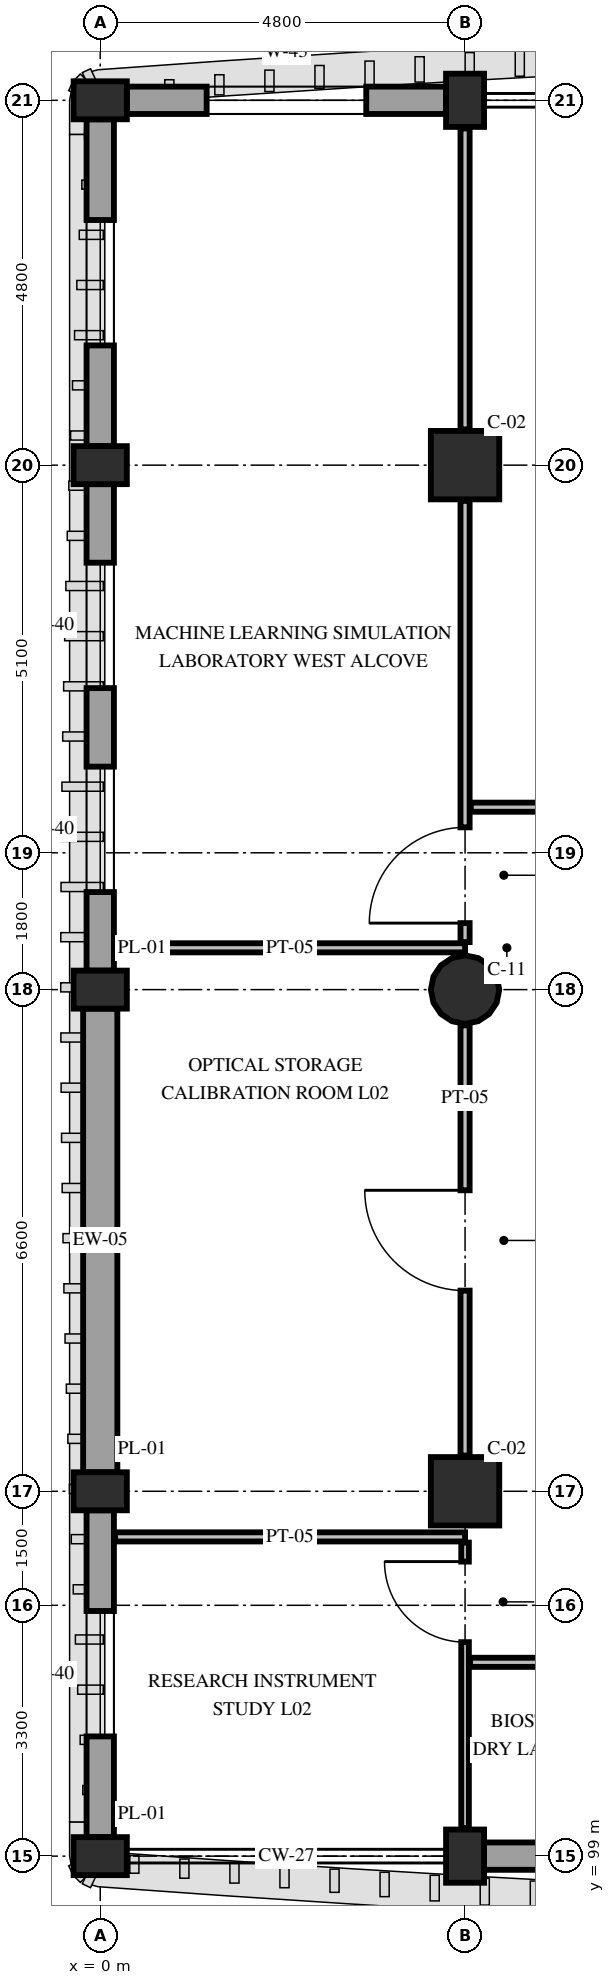
"""IFC4 building model, lengths in metres.
Left out: names, types, materials, properties, quantities, classifications, styles, units other than length and angle.
Written with IfcOpenShell. Run it as: python <this file> out.ifc"""

import sys

from ifc_helpers import new_model, si_unit, direction, frame, frame_2d, origin, origin_2d, place, context, subcontext, project, spatial, rectangle, circle, extrude, element, fill, save


model = new_model("IFC4")
c1 = context("Model", 3, precision=1e-05, world=origin(), true_north=direction((0.0, 1.0)))
c2 = subcontext(c1, "Body", "Model", "MODEL_VIEW")
j1 = project(units=[si_unit("LENGTHUNIT", "METRE"), si_unit("PLANEANGLEUNIT", "RADIAN")], contexts=[c1])
p1 = place(None, origin())
s1 = spatial("IfcSite", under=j1, at=p1, CompositionType="ELEMENT")
p2 = place(p1, origin())
s2 = spatial("IfcBuilding", under=s1, at=p2, CompositionType="ELEMENT")
p3 = place(p2, frame((0.0, 0.0, 10.2)))
s3 = spatial("IfcBuildingStorey", under=s2, at=p3, CompositionType="ELEMENT", Elevation=10.2)
for number, where, z_axis, x_axis in (
    (1, (0.0, 99.0, 0.0), (0.0, 0.0, 1.0), (0.0, 1.0, 0.0)),
    (2, (0.0, 103.8, 0.0), (0.0, 0.0, 1.0), (0.0, 1.0, 0.0)),
    (3, (0.0, 110.4, 0.0), (0.0, 0.0, 1.0), (0.0, 1.0, 0.0)),
    (4, (0.0, 117.3, 0.0), (0.0, 0.0, 1.0), (0.0, 1.0, 0.0)),
    (5, (0.0, 122.1, 0.0), (0.0, 0.0, 1.0), (0.0, 1.0, 0.0)),
    (6, (4.8, 99.0, 0.0), (0.0, 0.0, 1.0), (1.0, 0.0, 0.0)),
):
    element("IfcColumn", number, at=place(p3, frame(where, z_axis=z_axis, x_axis=x_axis)), inside=s3, PredefinedType="PILASTER", context=c2, shape_type="SweptSolid", body=[
        extrude(rectangle(XDim=0.5, YDim=0.7, at=origin_2d()), origin(), (0.0, 0.0, 1.0), 4.8),
    ])
p4 = place(p3, frame((4.8, 103.8, 0.0), z_axis=(0.0, 0.0, 1.0), x_axis=(1.0, 0.0, 0.0)))
e7 = element("IfcColumn", 7, at=p4, inside=s3, PredefinedType="COLUMN", context=c2, shape_type="SweptSolid", body=[
    extrude(rectangle(XDim=0.9, YDim=0.9, at=origin_2d()), origin(), (0.0, 0.0, 1.0), 4.8),
])
p5 = place(p3, frame((4.8, 110.4, 0.0), z_axis=(0.0, 0.0, 1.0), x_axis=(1.0, 0.0, 0.0)))
e8 = element("IfcColumn", 8, at=p5, inside=s3, PredefinedType="COLUMN", context=c2, shape_type="SweptSolid", body=[
    extrude(circle(Radius=0.45, at=origin_2d()), origin(), (0.0, 0.0, 1.0), 4.8),
])
p6 = place(p3, frame((4.8, 117.3, 0.0), z_axis=(0.0, 0.0, 1.0), x_axis=(1.0, 0.0, 0.0)))
e9 = element("IfcColumn", 9, at=p6, inside=s3, PredefinedType="COLUMN", context=c2, shape_type="SweptSolid", body=[
    extrude(rectangle(XDim=0.9, YDim=0.9, at=origin_2d()), origin(), (0.0, 0.0, 1.0), 4.8),
])
p7 = place(p3, frame((4.8, 122.1, 0.0), z_axis=(0.0, 0.0, 1.0), x_axis=(1.0, 0.0, 0.0)))
e10 = element("IfcColumn", 10, at=p7, inside=s3, PredefinedType="PILASTER", context=c2, shape_type="SweptSolid", body=[
    extrude(rectangle(XDim=0.5, YDim=0.7, at=origin_2d()), origin(), (0.0, 0.0, 1.0), 4.8),
])
p8 = place(p3, frame((0.0, 99.25, 0.0), z_axis=(0.0, 0.0, 1.0), x_axis=(0.0, 1.0, 0.0)))
e11 = element("IfcWall", 11, at=p8, inside=s3, PredefinedType="STANDARD", context=c2, shape_type="SweptSolid", body=[
    extrude(rectangle(XDim=4.3, YDim=0.36, at=frame_2d((2.15, 0.0))), origin(), (0.0, 0.0, 1.0), 3.95),
])
p9 = place(p8, frame((1.325, 0.0, 0.85)))
e12 = element("IfcOpeningElement", 12, at=p9, cuts=e11, PredefinedType="OPENING", context=c2, shape_type="SweptSolid", body=[
    extrude(rectangle(XDim=1.65, YDim=2.08, at=frame_2d((0.825, 1.04))), frame((0.0, 0.195, 0.0), z_axis=(0.0, -1.0, 0.0), x_axis=(1.0, 0.0, 0.0)), (0.0, 0.0, 1.0), 0.39),
])
p10 = place(p3, frame((0.0, 104.05, 0.0), z_axis=(0.0, 0.0, 1.0), x_axis=(0.0, 1.0, 0.0)))
e13 = element("IfcWall", 13, at=p10, inside=s3, PredefinedType="SOLIDWALL", context=c2, shape_type="SweptSolid", body=[
    extrude(rectangle(XDim=6.1, YDim=0.45, at=frame_2d((3.05, 0.0))), origin(), (0.0, 0.0, 1.0), 3.95),
])
p11 = place(p3, frame((0.0, 110.65, 0.0), z_axis=(0.0, 0.0, 1.0), x_axis=(0.0, 1.0, 0.0)))
e14 = element("IfcWall", 14, at=p11, inside=s3, PredefinedType="STANDARD", context=c2, shape_type="SweptSolid", body=[
    extrude(rectangle(XDim=6.4, YDim=0.36, at=frame_2d((3.2, 0.0))), origin(), (0.0, 0.0, 1.0), 3.95),
])
p12 = place(p11, frame((1.033, 0.0, 0.85)))
e15 = element("IfcOpeningElement", 15, at=p12, cuts=e14, PredefinedType="OPENING", context=c2, shape_type="SweptSolid", body=[
    extrude(rectangle(XDim=1.65, YDim=2.08, at=frame_2d((0.825, 1.04))), frame((0.0, 0.195, 0.0), z_axis=(0.0, -1.0, 0.0), x_axis=(1.0, 0.0, 0.0)), (0.0, 0.0, 1.0), 0.39),
])
p13 = place(p11, frame((3.717, 0.0, 0.85)))
e16 = element("IfcOpeningElement", 16, at=p13, cuts=e14, PredefinedType="OPENING", context=c2, shape_type="SweptSolid", body=[
    extrude(rectangle(XDim=1.65, YDim=2.08, at=frame_2d((0.825, 1.04))), frame((0.0, 0.195, 0.0), z_axis=(0.0, -1.0, 0.0), x_axis=(1.0, 0.0, 0.0)), (0.0, 0.0, 1.0), 0.39),
])
p14 = place(p3, frame((0.0, 117.55, 0.0), z_axis=(0.0, 0.0, 1.0), x_axis=(0.0, 1.0, 0.0)))
e17 = element("IfcWall", 17, at=p14, inside=s3, PredefinedType="STANDARD", context=c2, shape_type="SweptSolid", body=[
    extrude(rectangle(XDim=4.3, YDim=0.36, at=frame_2d((2.15, 0.0))), origin(), (0.0, 0.0, 1.0), 3.95),
])
p15 = place(p14, frame((1.325, 0.0, 0.85)))
e18 = element("IfcOpeningElement", 18, at=p15, cuts=e17, PredefinedType="OPENING", context=c2, shape_type="SweptSolid", body=[
    extrude(rectangle(XDim=1.65, YDim=2.08, at=frame_2d((0.825, 1.04))), frame((0.0, 0.195, 0.0), z_axis=(0.0, -1.0, 0.0), x_axis=(1.0, 0.0, 0.0)), (0.0, 0.0, 1.0), 0.39),
])
p16 = place(p3, frame((0.35, 122.1, 0.0), z_axis=(0.0, 0.0, 1.0), x_axis=(1.0, 0.0, 0.0)))
e19 = element("IfcWall", 19, at=p16, inside=s3, PredefinedType="STANDARD", context=c2, shape_type="SweptSolid", body=[
    extrude(rectangle(XDim=4.2, YDim=0.36, at=frame_2d((2.1, 0.0))), origin(), (0.0, 0.0, 1.0), 3.95),
])
p17 = place(p16, frame((1.05, 0.0, 0.85)))
e20 = element("IfcOpeningElement", 20, at=p17, cuts=e19, PredefinedType="OPENING", context=c2, shape_type="SweptSolid", body=[
    extrude(rectangle(XDim=2.1, YDim=2.08, at=frame_2d((1.05, 1.04))), frame((0.0, 0.195, 0.0), z_axis=(0.0, -1.0, 0.0), x_axis=(1.0, 0.0, 0.0)), (0.0, 0.0, 1.0), 0.39),
])
p18 = place(p3, frame((12.95, 99.0, 0.0), z_axis=(0.0, 0.0, 1.0), x_axis=(-1.0, 0.0, 0.0)))
e21 = element("IfcWall", 21, at=p18, inside=s3, PredefinedType="STANDARD", context=c2, shape_type="SweptSolid", body=[
    extrude(rectangle(XDim=7.9, YDim=0.36, at=frame_2d((3.95, 0.0))), origin(), (0.0, 0.0, 1.0), 3.93),
])
p19 = place(p18, frame((1.833, 0.0, 0.85)))
e22 = element("IfcOpeningElement", 22, at=p19, cuts=e21, PredefinedType="OPENING", context=c2, shape_type="SweptSolid", body=[
    extrude(rectangle(XDim=1.2, YDim=1.5, at=frame_2d((0.6, 0.75))), frame((0.0, 0.195, 0.0), z_axis=(0.0, -1.0, 0.0), x_axis=(1.0, 0.0, 0.0)), (0.0, 0.0, 1.0), 0.39),
])
p20 = place(p18, frame((4.867, 0.0, 0.85)))
e23 = element("IfcOpeningElement", 23, at=p20, cuts=e21, PredefinedType="OPENING", context=c2, shape_type="SweptSolid", body=[
    extrude(rectangle(XDim=1.2, YDim=1.5, at=frame_2d((0.6, 0.75))), frame((0.0, 0.195, 0.0), z_axis=(0.0, -1.0, 0.0), x_axis=(1.0, 0.0, 0.0)), (0.0, 0.0, 1.0), 0.39),
])
for number, where, z_axis, x_axis in (
    (24, (0.195, 103.2, 0.0), (0.0, 0.0, 1.0), (1.0, 0.0, 0.0)),
    (25, (0.195, 110.95, 0.0), (0.0, 0.0, 1.0), (1.0, 0.0, 0.0)),
):
    element("IfcWall", number, at=place(p3, frame(where, z_axis=z_axis, x_axis=x_axis)), inside=s3, PredefinedType="PARTITIONING", context=c2, shape_type="SweptSolid", body=[
        extrude(rectangle(XDim=4.605, YDim=0.12, at=frame_2d((2.302, 0.0))), origin(), (0.0, 0.0, 1.0), 4.08),
    ])
p21 = place(p3, frame((4.8, 104.27, 0.0), z_axis=(0.0, 0.0, 1.0), x_axis=(0.0, 1.0, 0.0)))
e26 = element("IfcWall", 26, at=p21, inside=s3, PredefinedType="PARTITIONING", context=c2, shape_type="SweptSolid", body=[
    extrude(rectangle(XDim=5.66, YDim=0.12, at=frame_2d((2.83, 0.0))), origin(), (0.0, 0.0, 1.0), 4.13),
])
p22 = place(p21, frame((2.17, 0.0, 0.0)))
e27 = element("IfcOpeningElement", 27, at=p22, cuts=e26, PredefinedType="OPENING", context=c2, shape_type="SweptSolid", body=[
    extrude(rectangle(XDim=1.32, YDim=2.2, at=frame_2d((0.66, 1.1))), frame((0.0, 0.075, 0.0), z_axis=(0.0, -1.0, 0.0), x_axis=(1.0, 0.0, 0.0)), (0.0, 0.0, 1.0), 0.15),
])
p23 = place(p3, frame((4.8, 111.025, 0.0), z_axis=(0.0, 0.0, 1.0), x_axis=(0.0, 1.0, 0.0)))
e28 = element("IfcWall", 28, at=p23, inside=s3, PredefinedType="PARTITIONING", context=c2, shape_type="SweptSolid", body=[
    extrude(rectangle(XDim=5.805, YDim=0.12, at=frame_2d((2.903, 0.0))), origin(), (0.0, 0.0, 1.0), 4.13),
])
p24 = place(p23, frame((0.25, 0.0, 0.0)))
e29 = element("IfcOpeningElement", 29, at=p24, cuts=e28, PredefinedType="OPENING", context=c2, shape_type="SweptSolid", body=[
    extrude(rectangle(XDim=1.26, YDim=2.2, at=frame_2d((0.63, 1.1))), frame((0.0, 0.075, 0.0), z_axis=(0.0, -1.0, 0.0), x_axis=(1.0, 0.0, 0.0)), (0.0, 0.0, 1.0), 0.15),
])
p25 = place(p3, frame((4.8, 117.77, 0.0), z_axis=(0.0, 0.0, 1.0), x_axis=(0.0, 1.0, 0.0)))
e30 = element("IfcWall", 30, at=p25, inside=s3, PredefinedType="PARTITIONING", context=c2, shape_type="SweptSolid", body=[
    extrude(rectangle(XDim=3.96, YDim=0.12, at=frame_2d((1.98, 0.0))), origin(), (0.0, 0.0, 1.0), 4.13),
])
p26 = place(p3, frame((4.875, 112.8, 0.0), z_axis=(0.0, 0.0, 1.0), x_axis=(1.0, 0.0, 0.0)))
e31 = element("IfcWall", 31, at=p26, inside=s3, PredefinedType="PARTITIONING", context=c2, shape_type="SweptSolid", body=[
    extrude(rectangle(XDim=14.265, YDim=0.12, at=frame_2d((7.132, 0.0))), origin(), (0.0, 0.0, 1.0), 4.13),
])
p27 = place(p26, frame((9.155, 0.0, 0.0)))
e32 = element("IfcOpeningElement", 32, at=p27, cuts=e31, PredefinedType="OPENING", context=c2, shape_type="SweptSolid", body=[
    extrude(rectangle(XDim=1.44, YDim=2.25, at=frame_2d((0.72, 1.125))), frame((0.0, 0.075, 0.0), z_axis=(0.0, -1.0, 0.0), x_axis=(1.0, 0.0, 0.0)), (0.0, 0.0, 1.0), 0.15),
])
p28 = place(p3, frame((4.8, 99.37, 0.0), z_axis=(0.0, 0.0, 1.0), x_axis=(0.0, 1.0, 0.0)))
e33 = element("IfcWall", 33, at=p28, inside=s3, PredefinedType="PARTITIONING", context=c2, shape_type="SweptSolid", body=[
    extrude(rectangle(XDim=3.755, YDim=0.1, at=frame_2d((1.877, 0.0))), origin(), (0.0, 0.0, 1.0), 4.13),
])
p29 = place(p28, frame((2.445, 0.0, 0.0)))
e34 = element("IfcOpeningElement", 34, at=p29, cuts=e33, PredefinedType="OPENING", context=c2, shape_type="SweptSolid", body=[
    extrude(rectangle(XDim=1.06, YDim=2.2, at=frame_2d((0.53, 1.1))), frame((0.0, 0.065, 0.0), z_axis=(0.0, -1.0, 0.0), x_axis=(1.0, 0.0, 0.0)), (0.0, 0.0, 1.0), 0.13),
])
p30 = place(p3, frame((4.865, 101.55, 0.0), z_axis=(0.0, 0.0, 1.0), x_axis=(1.0, 0.0, 0.0)))
e35 = element("IfcWall", 35, at=p30, inside=s3, PredefinedType="PARTITIONING", context=c2, shape_type="SweptSolid", body=[
    extrude(rectangle(XDim=10.735, YDim=0.12, at=frame_2d((5.368, 0.0))), origin(), (0.0, 0.0, 1.0), 4.13),
])
p31 = place(p30, frame((4.645, 0.0, 0.0)))
e36 = element("IfcOpeningElement", 36, at=p31, cuts=e35, PredefinedType="OPENING", context=c2, shape_type="SweptSolid", body=[
    extrude(rectangle(XDim=1.38, YDim=2.25, at=frame_2d((0.69, 1.125))), frame((0.0, 0.075, 0.0), z_axis=(0.0, -1.0, 0.0), x_axis=(1.0, 0.0, 0.0)), (0.0, 0.0, 1.0), 0.15),
])
p32 = place(p9, origin())
e37 = element("IfcWindow", 37, at=p32, inside=s3, PartitioningType="SINGLE_PANEL", PredefinedType="WINDOW", context=c2, shape_type="SweptSolid", body=[
    extrude(rectangle(XDim=1.65, YDim=2.08, at=frame_2d((0.825, 1.04))), frame((0.0, 0.03, 0.0), z_axis=(0.0, -1.0, 0.0), x_axis=(1.0, 0.0, 0.0)), (0.0, 0.0, 1.0), 0.06),
])
fill(e12, e37)
p33 = place(p12, origin())
e38 = element("IfcWindow", 38, at=p33, inside=s3, PartitioningType="SINGLE_PANEL", PredefinedType="WINDOW", context=c2, shape_type="SweptSolid", body=[
    extrude(rectangle(XDim=1.65, YDim=2.08, at=frame_2d((0.825, 1.04))), frame((0.0, 0.03, 0.0), z_axis=(0.0, -1.0, 0.0), x_axis=(1.0, 0.0, 0.0)), (0.0, 0.0, 1.0), 0.06),
])
fill(e15, e38)
p34 = place(p13, origin())
e39 = element("IfcWindow", 39, at=p34, inside=s3, PartitioningType="SINGLE_PANEL", PredefinedType="WINDOW", context=c2, shape_type="SweptSolid", body=[
    extrude(rectangle(XDim=1.65, YDim=2.08, at=frame_2d((0.825, 1.04))), frame((0.0, 0.03, 0.0), z_axis=(0.0, -1.0, 0.0), x_axis=(1.0, 0.0, 0.0)), (0.0, 0.0, 1.0), 0.06),
])
fill(e16, e39)
p35 = place(p15, origin())
e40 = element("IfcWindow", 40, at=p35, inside=s3, PartitioningType="SINGLE_PANEL", PredefinedType="WINDOW", context=c2, shape_type="SweptSolid", body=[
    extrude(rectangle(XDim=1.65, YDim=2.08, at=frame_2d((0.825, 1.04))), frame((0.0, 0.03, 0.0), z_axis=(0.0, -1.0, 0.0), x_axis=(1.0, 0.0, 0.0)), (0.0, 0.0, 1.0), 0.06),
])
fill(e18, e40)
p36 = place(p17, origin())
e41 = element("IfcWindow", 41, at=p36, inside=s3, PartitioningType="DOUBLE_PANEL_VERTICAL", PredefinedType="WINDOW", context=c2, shape_type="SweptSolid", body=[
    extrude(rectangle(XDim=2.1, YDim=2.08, at=frame_2d((1.05, 1.04))), frame((0.0, 0.03, 0.0), z_axis=(0.0, -1.0, 0.0), x_axis=(1.0, 0.0, 0.0)), (0.0, 0.0, 1.0), 0.06),
])
fill(e20, e41)
p37 = place(p22, origin())
e42 = element("IfcDoor", 42, at=p37, inside=s3, OperationType="SINGLE_SWING_RIGHT", PredefinedType="DOOR", context=c2, shape_type="SweptSolid", body=[
    extrude(rectangle(XDim=1.32, YDim=2.2, at=frame_2d((0.66, 1.1))), frame((0.0, 0.025, 0.0), z_axis=(0.0, -1.0, 0.0), x_axis=(1.0, 0.0, 0.0)), (0.0, 0.0, 1.0), 0.05),
])
fill(e27, e42)
p38 = place(p24, origin())
e43 = element("IfcDoor", 43, at=p38, inside=s3, OperationType="SINGLE_SWING_LEFT", PredefinedType="DOOR", context=c2, shape_type="SweptSolid", body=[
    extrude(rectangle(XDim=1.26, YDim=2.2, at=frame_2d((0.63, 1.1))), frame((0.0, 0.025, 0.0), z_axis=(0.0, -1.0, 0.0), x_axis=(1.0, 0.0, 0.0)), (0.0, 0.0, 1.0), 0.05),
])
fill(e29, e43)
p39 = place(p29, origin())
e44 = element("IfcDoor", 44, at=p39, inside=s3, OperationType="SINGLE_SWING_RIGHT", PredefinedType="DOOR", context=c2, shape_type="SweptSolid", body=[
    extrude(rectangle(XDim=1.06, YDim=2.2, at=frame_2d((0.53, 1.1))), frame((0.0, 0.025, 0.0), z_axis=(0.0, -1.0, 0.0), x_axis=(1.0, 0.0, 0.0)), (0.0, 0.0, 1.0), 0.05),
])
fill(e34, e44)
save(model, sys.argv[1])
